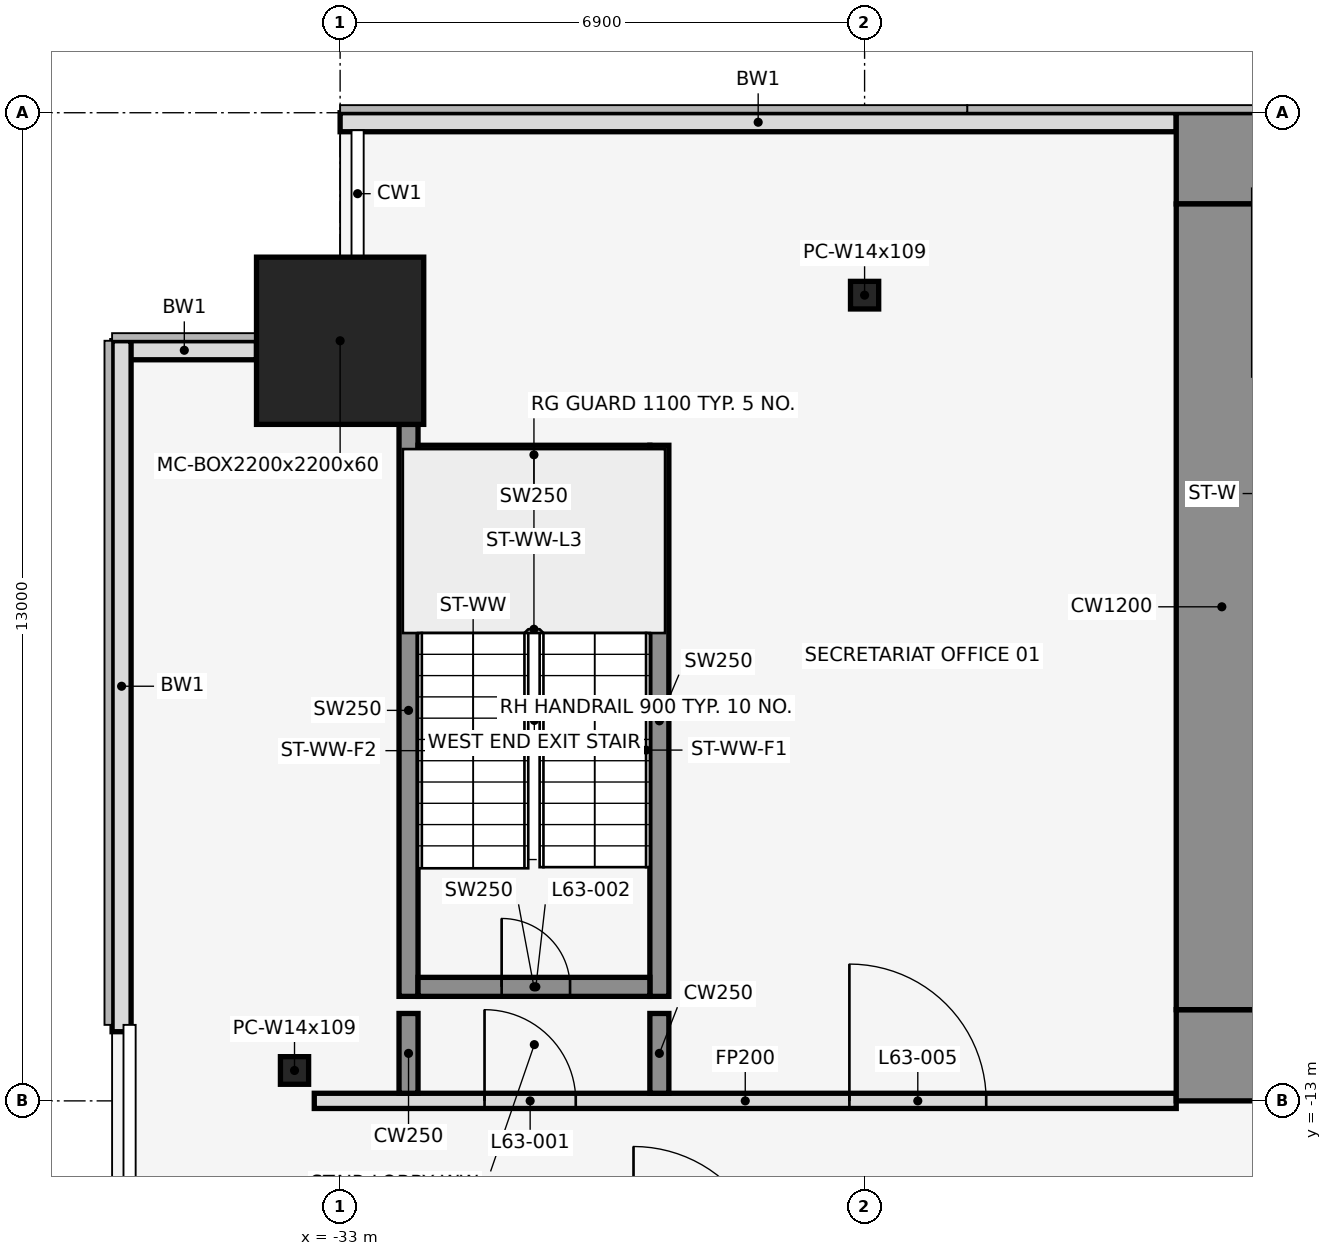
"""IFC4 building model, lengths in metres.
Left out: names, types, materials, properties, quantities, classifications, styles, units other than length and angle.
Written with IfcOpenShell. Run it as: python <this file> out.ifc"""

import sys

from ifc_helpers import new_model, si_unit, direction, frame, frame_2d, origin, origin_2d, place, context, subcontext, project, spatial, rectangle, hollow_rectangle, i_section, extrude, element, fill, save


model = new_model("IFC4")
c1 = context("Model", 3, precision=1e-05, world=origin(), true_north=direction((0.0, 1.0)))
c2 = subcontext(c1, "Body", "Model", "MODEL_VIEW")
j1 = project(units=[si_unit("LENGTHUNIT", "METRE"), si_unit("PLANEANGLEUNIT", "RADIAN")], contexts=[c1])
p1 = place(None, origin())
s1 = spatial("IfcSite", under=j1, at=p1, CompositionType="ELEMENT")
p2 = place(p1, origin())
s2 = spatial("IfcBuilding", under=s1, at=p2, CompositionType="ELEMENT")
p3 = place(p2, frame((0.0, 0.0, 279.2)))
s3 = spatial("IfcBuildingStorey", under=s2, at=p3, CompositionType="ELEMENT", Elevation=279.2)
p4 = place(p3, frame((-33.0, -3.0, 0.0), z_axis=(0.0, 0.0, 1.0), x_axis=(1.0, 0.0, 0.0)))
e1 = element("IfcColumn", 1, at=p4, inside=s3, PredefinedType="COLUMN", context=c2, shape_type="SweptSolid", body=[
    extrude(hollow_rectangle(XDim=2.2, YDim=2.2, WallThickness=0.06, at=origin_2d()), origin(), (0.0, 0.0, 1.0), 4.2),
])
for number, where, z_axis, x_axis in (
    (2, (-26.1, -2.4, 0.0), (0.0, 0.0, 1.0), (1.0, 0.0, 0.0)),
    (3, (-33.6, -12.6, 0.0), (0.0, 0.0, 1.0), (1.0, 0.0, 0.0)),
):
    element("IfcColumn", number, at=place(p3, frame(where, z_axis=z_axis, x_axis=x_axis)), inside=s3, PredefinedType="COLUMN", context=c2, shape_type="SweptSolid", body=[
        extrude(i_section(OverallWidth=0.371, OverallDepth=0.363, WebThickness=0.013, FlangeThickness=0.022, at=origin_2d()), origin(), (0.0, 0.0, 1.0), 4.2),
    ])
p5 = place(p3, frame((-22.0, -0.125, 0.0), z_axis=(0.0, 0.0, 1.0), x_axis=(-1.0, 0.0, 0.0)))
e4 = element("IfcWall", 4, at=p5, inside=s3, PredefinedType="STANDARD", context=c2, shape_type="SweptSolid", body=[
    extrude(rectangle(XDim=11.0, YDim=0.25, at=frame_2d((5.5, 0.0))), origin(), (0.0, 0.0, 1.0), 4.05),
])
p6 = place(p3, frame((-34.1, -3.125, 0.0), z_axis=(0.0, 0.0, 1.0), x_axis=(-1.0, 0.0, 0.0)))
e5 = element("IfcWall", 5, at=p6, inside=s3, PredefinedType="STANDARD", context=c2, shape_type="SweptSolid", body=[
    extrude(rectangle(XDim=1.9, YDim=0.25, at=frame_2d((0.95, 0.0))), origin(), (0.0, 0.0, 1.0), 4.05),
])
p7 = place(p3, frame((-35.875, -3.0, 0.0), z_axis=(0.0, 0.0, 1.0), x_axis=(0.0, -1.0, 0.0)))
e6 = element("IfcWall", 6, at=p7, inside=s3, PredefinedType="STANDARD", context=c2, shape_type="SweptSolid", body=[
    extrude(rectangle(XDim=9.09, YDim=0.25, at=frame_2d((4.545, 0.0))), origin(), (0.0, 0.0, 1.0), 4.05),
])
p8 = place(p3, frame((-32.1, -11.625, 0.0), z_axis=(0.0, 0.0, 1.0), x_axis=(0.0, 1.0, 0.0)))
e7 = element("IfcWall", 7, at=p8, inside=s3, PredefinedType="SHEAR", context=c2, shape_type="SweptSolid", body=[
    extrude(rectangle(XDim=7.525, YDim=0.25, at=frame_2d((3.762, 0.0))), origin(), (0.0, 0.0, 1.0), 4.2),
])
p9 = place(p3, frame((-28.8, -11.625, 0.0), z_axis=(0.0, 0.0, 1.0), x_axis=(0.0, 1.0, 0.0)))
e8 = element("IfcWall", 8, at=p9, inside=s3, PredefinedType="SHEAR", context=c2, shape_type="SweptSolid", body=[
    extrude(rectangle(XDim=7.25, YDim=0.25, at=frame_2d((3.625, 0.0))), origin(), (0.0, 0.0, 1.0), 4.2),
])
p10 = place(p3, frame((-31.975, -11.5, 0.0), z_axis=(0.0, 0.0, 1.0), x_axis=(1.0, 0.0, 0.0)))
e9 = element("IfcWall", 9, at=p10, inside=s3, PredefinedType="SHEAR", context=c2, shape_type="SweptSolid", body=[
    extrude(rectangle(XDim=3.05, YDim=0.25, at=frame_2d((1.525, 0.0))), origin(), (0.0, 0.0, 1.0), 4.2),
])
p11 = place(p10, frame((1.1, 0.0, 0.0)))
e10 = element("IfcOpeningElement", 10, at=p11, cuts=e9, PredefinedType="OPENING", context=c2, shape_type="SweptSolid", body=[
    extrude(rectangle(XDim=0.9, YDim=2.1, at=frame_2d((0.45, 1.05))), frame((0.0, 0.137, 0.0), z_axis=(0.0, -1.0, 0.0), x_axis=(1.0, 0.0, 0.0)), (0.0, 0.0, 1.0), 0.274),
])
p12 = place(p3, frame((-31.975, -4.5, 0.0), z_axis=(0.0, 0.0, 1.0), x_axis=(1.0, 0.0, 0.0)))
e11 = element("IfcWall", 11, at=p12, inside=s3, PredefinedType="SHEAR", context=c2, shape_type="SweptSolid", body=[
    extrude(rectangle(XDim=3.05, YDim=0.25, at=frame_2d((1.525, 0.0))), origin(), (0.0, 0.0, 1.0), 4.2),
])
p13 = place(p3, frame((-33.34, -13.0, 0.0), z_axis=(0.0, 0.0, 1.0), x_axis=(1.0, 0.0, 0.0)))
e12 = element("IfcWall", 12, at=p13, inside=s3, PredefinedType="PARTITIONING", context=c2, shape_type="SweptSolid", body=[
    extrude(rectangle(XDim=11.34, YDim=0.2, at=frame_2d((5.67, 0.0))), origin(), (0.0, 0.0, 1.0), 3.04),
])
p14 = place(p13, frame((2.24, 0.0, 0.0)))
e13 = element("IfcOpeningElement", 13, at=p14, cuts=e12, PredefinedType="OPENING", context=c2, shape_type="SweptSolid", body=[
    extrude(rectangle(XDim=1.2, YDim=2.1, at=frame_2d((0.6, 1.05))), frame((0.0, 0.112, 0.0), z_axis=(0.0, -1.0, 0.0), x_axis=(1.0, 0.0, 0.0)), (0.0, 0.0, 1.0), 0.224),
])
p15 = place(p13, frame((7.04, 0.0, 0.0)))
e14 = element("IfcOpeningElement", 14, at=p15, cuts=e12, PredefinedType="OPENING", context=c2, shape_type="SweptSolid", body=[
    extrude(rectangle(XDim=1.8, YDim=2.1, at=frame_2d((0.9, 1.05))), frame((0.0, 0.112, 0.0), z_axis=(0.0, -1.0, 0.0), x_axis=(1.0, 0.0, 0.0)), (0.0, 0.0, 1.0), 0.224),
])
for number, where, z_axis, x_axis in (
    (15, (-32.1, -12.9, 0.0), (0.0, 0.0, 1.0), (0.0, 1.0, 0.0)),
    (16, (-28.8, -12.9, 0.0), (0.0, 0.0, 1.0), (0.0, 1.0, 0.0)),
):
    element("IfcWall", number, at=place(p3, frame(where, z_axis=z_axis, x_axis=x_axis)), inside=s3, PredefinedType="SHEAR", context=c2, shape_type="SweptSolid", body=[
        extrude(rectangle(XDim=1.05, YDim=0.25, at=frame_2d((0.525, 0.0))), origin(), (0.0, 0.0, 1.0), 4.2),
    ])
p16 = place(p3, frame((-22.0, -0.6, 0.0), z_axis=(0.0, 0.0, 1.0), x_axis=(1.0, 0.0, 0.0)))
e17 = element("IfcWall", 17, at=p16, inside=s3, PredefinedType="SHEAR", context=c2, shape_type="SweptSolid", body=[
    extrude(rectangle(XDim=44.0, YDim=1.2, at=frame_2d((22.0, 0.0))), origin(), (0.0, 0.0, 1.0), 4.2),
])
p17 = place(p16, frame((18.55, 0.0, 0.0)))
e18 = element("IfcOpeningElement", 18, at=p17, cuts=e17, PredefinedType="OPENING", context=c2, shape_type="SweptSolid", body=[
    extrude(rectangle(XDim=0.9, YDim=2.1, at=frame_2d((0.45, 1.05))), frame((0.0, 0.612, 0.0), z_axis=(0.0, -1.0, 0.0), x_axis=(1.0, 0.0, 0.0)), (0.0, 0.0, 1.0), 1.224),
])
p18 = place(p16, frame((24.55, 0.0, 0.0)))
e19 = element("IfcOpeningElement", 19, at=p18, cuts=e17, PredefinedType="OPENING", context=c2, shape_type="SweptSolid", body=[
    extrude(rectangle(XDim=0.9, YDim=2.1, at=frame_2d((0.45, 1.05))), frame((0.0, 0.612, 0.0), z_axis=(0.0, -1.0, 0.0), x_axis=(1.0, 0.0, 0.0)), (0.0, 0.0, 1.0), 1.224),
])
p19 = place(p3, frame((-22.0, -12.4, 0.0), z_axis=(0.0, 0.0, 1.0), x_axis=(1.0, 0.0, 0.0)))
e20 = element("IfcWall", 20, at=p19, inside=s3, PredefinedType="SHEAR", context=c2, shape_type="SweptSolid", body=[
    extrude(rectangle(XDim=44.0, YDim=1.2, at=frame_2d((22.0, 0.0))), origin(), (0.0, 0.0, 1.0), 4.2),
])
p20 = place(p19, frame((2.2, 0.0, 0.0)))
e21 = element("IfcOpeningElement", 21, at=p20, cuts=e20, PredefinedType="OPENING", context=c2, shape_type="SweptSolid", body=[
    extrude(rectangle(XDim=1.2, YDim=2.1, at=frame_2d((0.6, 1.05))), frame((0.0, 0.612, 0.0), z_axis=(0.0, -1.0, 0.0), x_axis=(1.0, 0.0, 0.0)), (0.0, 0.0, 1.0), 1.224),
])
p21 = place(p19, frame((21.4, 0.0, 0.0)))
e22 = element("IfcOpeningElement", 22, at=p21, cuts=e20, PredefinedType="OPENING", context=c2, shape_type="SweptSolid", body=[
    extrude(rectangle(XDim=1.2, YDim=2.1, at=frame_2d((0.6, 1.05))), frame((0.0, 0.612, 0.0), z_axis=(0.0, -1.0, 0.0), x_axis=(1.0, 0.0, 0.0)), (0.0, 0.0, 1.0), 1.224),
])
p22 = place(p19, frame((40.6, 0.0, 0.0)))
e23 = element("IfcOpeningElement", 23, at=p22, cuts=e20, PredefinedType="OPENING", context=c2, shape_type="SweptSolid", body=[
    extrude(rectangle(XDim=1.2, YDim=2.1, at=frame_2d((0.6, 1.05))), frame((0.0, 0.612, 0.0), z_axis=(0.0, -1.0, 0.0), x_axis=(1.0, 0.0, 0.0)), (0.0, 0.0, 1.0), 1.224),
])
p23 = place(p19, frame((16.0, 0.0, 0.0)))
e24 = element("IfcOpeningElement", 24, at=p23, cuts=e20, PredefinedType="OPENING", context=c2, shape_type="SweptSolid", body=[
    extrude(rectangle(XDim=1.8, YDim=2.1, at=frame_2d((0.9, 1.05))), frame((0.0, 0.612, 0.0), z_axis=(0.0, -1.0, 0.0), x_axis=(1.0, 0.0, 0.0)), (0.0, 0.0, 1.0), 1.224),
])
p24 = place(p19, frame((6.3, 0.0, 0.0)))
e25 = element("IfcOpeningElement", 25, at=p24, cuts=e20, PredefinedType="OPENING", context=c2, shape_type="SweptSolid", body=[
    extrude(rectangle(XDim=1.2, YDim=2.1, at=frame_2d((0.6, 1.05))), frame((0.0, 0.612, 0.0), z_axis=(0.0, -1.0, 0.0), x_axis=(1.0, 0.0, 0.0)), (0.0, 0.0, 1.0), 1.224),
])
p25 = place(p19, frame((26.2, 0.0, 0.0)))
e26 = element("IfcOpeningElement", 26, at=p25, cuts=e20, PredefinedType="OPENING", context=c2, shape_type="SweptSolid", body=[
    extrude(rectangle(XDim=1.8, YDim=2.1, at=frame_2d((0.9, 1.05))), frame((0.0, 0.612, 0.0), z_axis=(0.0, -1.0, 0.0), x_axis=(1.0, 0.0, 0.0)), (0.0, 0.0, 1.0), 1.224),
])
p26 = place(p19, frame((36.5, 0.0, 0.0)))
e27 = element("IfcOpeningElement", 27, at=p26, cuts=e20, PredefinedType="OPENING", context=c2, shape_type="SweptSolid", body=[
    extrude(rectangle(XDim=1.2, YDim=2.1, at=frame_2d((0.6, 1.05))), frame((0.0, 0.612, 0.0), z_axis=(0.0, -1.0, 0.0), x_axis=(1.0, 0.0, 0.0)), (0.0, 0.0, 1.0), 1.224),
])
p27 = place(p3, frame((-21.4, -11.8, 0.0), z_axis=(0.0, 0.0, 1.0), x_axis=(0.0, 1.0, 0.0)))
e28 = element("IfcWall", 28, at=p27, inside=s3, PredefinedType="SHEAR", context=c2, shape_type="SweptSolid", body=[
    extrude(rectangle(XDim=10.6, YDim=1.2, at=frame_2d((5.3, 0.0))), origin(), (0.0, 0.0, 1.0), 4.2),
])
p28 = place(p14, origin())
e29 = element("IfcDoor", 29, at=p28, inside=s3, OperationType="SINGLE_SWING_LEFT", PredefinedType="DOOR", context=c2, shape_type="SweptSolid", body=[
    extrude(rectangle(XDim=1.2, YDim=2.1, at=frame_2d((0.6, 1.05))), frame((0.0, 0.025, 0.0), z_axis=(0.0, -1.0, 0.0), x_axis=(1.0, 0.0, 0.0)), (0.0, 0.0, 1.0), 0.05),
])
fill(e13, e29)
p29 = place(p11, origin())
e30 = element("IfcDoor", 30, at=p29, inside=s3, OperationType="SINGLE_SWING_LEFT", PredefinedType="DOOR", context=c2, shape_type="SweptSolid", body=[
    extrude(rectangle(XDim=0.9, YDim=2.1, at=frame_2d((0.45, 1.05))), frame((0.0, 0.025, 0.0), z_axis=(0.0, -1.0, 0.0), x_axis=(1.0, 0.0, 0.0)), (0.0, 0.0, 1.0), 0.05),
])
fill(e10, e30)
p30 = place(p15, origin())
e31 = element("IfcDoor", 31, at=p30, inside=s3, OperationType="SINGLE_SWING_LEFT", PredefinedType="DOOR", context=c2, shape_type="SweptSolid", body=[
    extrude(rectangle(XDim=1.8, YDim=2.1, at=frame_2d((0.9, 1.05))), frame((0.0, 0.025, 0.0), z_axis=(0.0, -1.0, 0.0), x_axis=(1.0, 0.0, 0.0)), (0.0, 0.0, 1.0), 0.05),
])
fill(e14, e31)
save(model, sys.argv[1])
